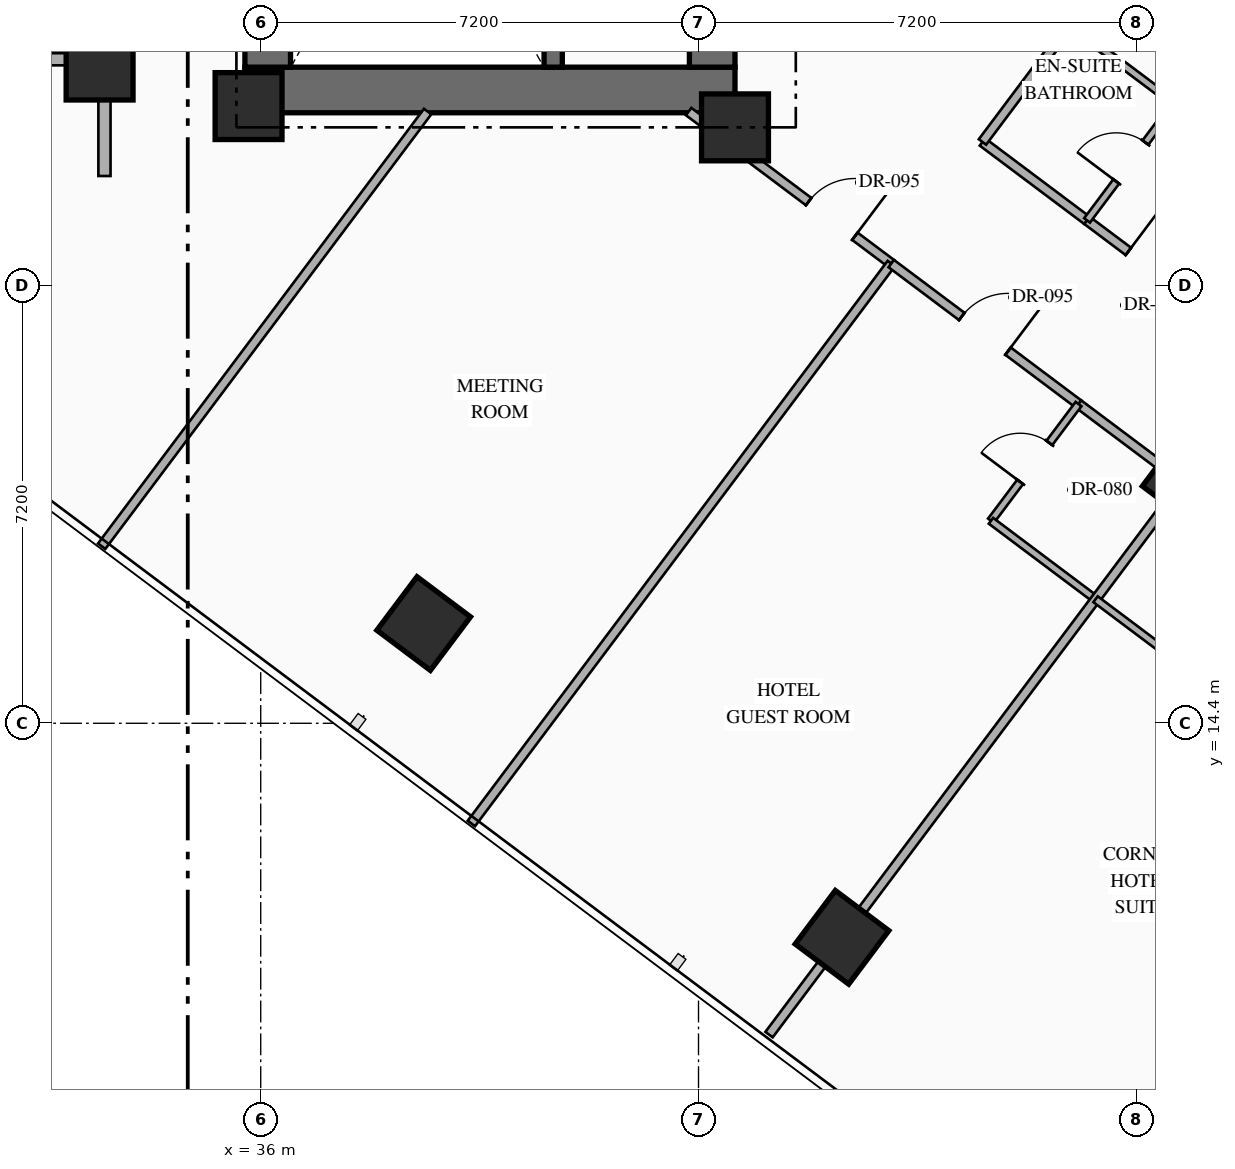
"""IFC4 building model, lengths in metres.
Left out: names, types, materials, properties, quantities, classifications, styles, units other than length and angle.
Written with IfcOpenShell. Run it as: python <this file> out.ifc"""

import sys

from ifc_helpers import new_model, si_unit, direction, frame, frame_2d, origin, origin_2d, place, context, subcontext, project, spatial, rectangle, hollow_rectangle, extrude, element, fill, save


model = new_model("IFC4")
c1 = context("Model", 3, precision=1e-05, world=origin(), true_north=direction((0.0, 1.0)))
c2 = subcontext(c1, "Body", "Model", "MODEL_VIEW")
j1 = project(units=[si_unit("LENGTHUNIT", "METRE"), si_unit("PLANEANGLEUNIT", "RADIAN")], contexts=[c1])
p1 = place(None, origin())
s1 = spatial("IfcSite", under=j1, at=p1, CompositionType="ELEMENT")
p2 = place(p1, origin())
s2 = spatial("IfcBuilding", under=s1, at=p2, CompositionType="ELEMENT")
p3 = place(p2, frame((0.0, 0.0, 63.4)))
s3 = spatial("IfcBuildingStorey", under=s2, at=p3, CompositionType="ELEMENT", Elevation=63.4)
p4 = place(p3, frame((35.74, 24.815, 0.0), z_axis=(0.0, 0.0, 1.0), x_axis=(1.0, 0.0, 0.0)))
e1 = element("IfcWall", 1, at=p4, inside=s3, PredefinedType="SHEAR", context=c2, shape_type="SweptSolid", body=[
    extrude(rectangle(XDim=8.06, YDim=0.75, at=frame_2d((4.03, 0.0))), origin(), (0.0, 0.0, 1.0), 3.35),
])
p5 = place(p3, frame((36.115, 25.19, 0.0), z_axis=(0.0, 0.0, 1.0), x_axis=(0.0, 1.0, 0.0)))
e2 = element("IfcWall", 2, at=p5, inside=s3, PredefinedType="SHEAR", context=c2, shape_type="SweptSolid", body=[
    extrude(rectangle(XDim=9.48, YDim=0.75, at=frame_2d((4.74, 0.0))), origin(), (0.0, 0.0, 1.0), 3.35),
])
p6 = place(p3, frame((43.425, 25.19, 0.0), z_axis=(0.0, 0.0, 1.0), x_axis=(0.0, 1.0, 0.0)))
e3 = element("IfcWall", 3, at=p6, inside=s3, PredefinedType="SHEAR", context=c2, shape_type="SweptSolid", body=[
    extrude(rectangle(XDim=9.48, YDim=0.75, at=frame_2d((4.74, 0.0))), origin(), (0.0, 0.0, 1.0), 3.35),
])
p7 = place(p6, frame((1.51, 0.0, 0.0)))
e4 = element("IfcOpeningElement", 4, at=p7, cuts=e3, PredefinedType="OPENING", context=c2, shape_type="SweptSolid", body=[
    extrude(rectangle(XDim=0.85, YDim=2.08, at=frame_2d((0.425, 1.04))), frame((0.0, 0.385, 0.0), z_axis=(0.0, -1.0, 0.0), x_axis=(1.0, 0.0, 0.0)), (0.0, 0.0, 1.0), 0.77),
])
p8 = place(p6, frame((4.76, 0.0, 0.0)))
e5 = element("IfcOpeningElement", 5, at=p8, cuts=e3, PredefinedType="OPENING", context=c2, shape_type="SweptSolid", body=[
    extrude(rectangle(XDim=0.85, YDim=2.08, at=frame_2d((0.425, 1.04))), frame((0.0, 0.385, 0.0), z_axis=(0.0, -1.0, 0.0), x_axis=(1.0, 0.0, 0.0)), (0.0, 0.0, 1.0), 0.77),
])
p9 = place(p3, frame((40.81, 25.19, 0.0), z_axis=(0.0, 0.0, 1.0), x_axis=(0.0, 1.0, 0.0)))
e6 = element("IfcWall", 6, at=p9, inside=s3, PredefinedType="SHEAR", context=c2, shape_type="SweptSolid", body=[
    extrude(rectangle(XDim=9.48, YDim=0.3, at=frame_2d((4.74, 0.0))), origin(), (0.0, 0.0, 1.0), 3.35),
])
for number, where, z_axis, x_axis in (
    (7, (35.8, 24.55, 0.0), (0.0, 0.0, 1.0), (1.0, 0.0, 0.0)),
    (8, (43.8, 24.2, 0.0), (0.0, 0.0, 1.0), (1.0, 0.0, 0.0)),
):
    element("IfcColumn", number, at=place(p3, frame(where, z_axis=z_axis, x_axis=x_axis)), inside=s3, PredefinedType="COLUMN", context=c2, shape_type="SweptSolid", body=[
        extrude(rectangle(XDim=1.1, YDim=1.1, at=origin_2d()), origin(), (0.0, 0.0, 1.0), 3.35),
    ])
for number, where, z_axis, x_axis in (
    (9, (33.35, 25.2, 0.0), (0.0, 0.0, 1.0), (1.0, 0.0, 0.0)),
    (10, (38.68, 16.04, 0.0), (0.0, 0.0, 1.0), (0.8, -0.6, 0.0)),
    (11, (45.56, 10.88, 0.0), (0.0, 0.0, 1.0), (0.8, -0.6, 0.0)),
):
    element("IfcColumn", number, at=place(p3, frame(where, z_axis=z_axis, x_axis=x_axis)), inside=s3, PredefinedType="COLUMN", context=c2, shape_type="SweptSolid", body=[
        extrude(hollow_rectangle(XDim=1.1, YDim=1.1, WallThickness=0.04, at=origin_2d()), origin(), (0.0, 0.0, 1.0), 3.35),
    ])
p10 = place(p3, frame((51.2, 18.4, 0.0), z_axis=(0.0, 0.0, 1.0), x_axis=(0.799999996291, -0.600000004945, 0.0)))
e12 = element("IfcColumn", 12, at=p10, inside=s3, PredefinedType="COLUMN", context=c2, shape_type="SweptSolid", body=[
    extrude(hollow_rectangle(XDim=1.0, YDim=1.0, WallThickness=0.038, at=origin_2d()), origin(), (0.0, 0.0, 1.0), 3.35),
])
p11 = place(p3, frame((44.86, 40.73, 0.0), z_axis=(0.0, 0.0, 1.0), x_axis=(0.800006902154, -0.599990797017, 0.0)))
e13 = element("IfcWall", 13, at=p11, inside=s3, PredefinedType="STANDARD", context=c2, shape_type="SweptSolid", body=[
    extrude(rectangle(XDim=29.712, YDim=0.28, at=frame_2d((14.856, 0.0))), origin(), (0.0, 0.0, 1.0), 3.13),
])
p12 = place(p11, frame((14.249, 0.0, 0.0)))
e14 = element("IfcOpeningElement", 14, at=p12, cuts=e13, PredefinedType="OPENING", context=c2, shape_type="SweptSolid", body=[
    extrude(rectangle(XDim=1.1, YDim=2.2, at=frame_2d((0.55, 1.1))), frame((0.0, 0.15, 0.0), z_axis=(0.0, -1.0, 0.0), x_axis=(1.0, 0.0, 0.0)), (0.0, 0.0, 1.0), 0.3),
])
p13 = place(p11, frame((1.612, 0.0, 0.85)))
e15 = element("IfcOpeningElement", 15, at=p13, cuts=e13, PredefinedType="OPENING", context=c2, shape_type="SweptSolid", body=[
    extrude(rectangle(XDim=1.4, YDim=1.8, at=frame_2d((0.7, 0.9))), frame((0.0, 0.15, 0.0), z_axis=(0.0, -1.0, 0.0), x_axis=(1.0, 0.0, 0.0)), (0.0, 0.0, 1.0), 0.3),
])
p14 = place(p11, frame((5.667, 0.0, 0.85)))
e16 = element("IfcOpeningElement", 16, at=p14, cuts=e13, PredefinedType="OPENING", context=c2, shape_type="SweptSolid", body=[
    extrude(rectangle(XDim=1.4, YDim=1.8, at=frame_2d((0.7, 0.9))), frame((0.0, 0.15, 0.0), z_axis=(0.0, -1.0, 0.0), x_axis=(1.0, 0.0, 0.0)), (0.0, 0.0, 1.0), 0.3),
])
p15 = place(p11, frame((9.912, 0.0, 0.85)))
e17 = element("IfcOpeningElement", 17, at=p15, cuts=e13, PredefinedType="OPENING", context=c2, shape_type="SweptSolid", body=[
    extrude(rectangle(XDim=1.4, YDim=1.8, at=frame_2d((0.7, 0.9))), frame((0.0, 0.15, 0.0), z_axis=(0.0, -1.0, 0.0), x_axis=(1.0, 0.0, 0.0)), (0.0, 0.0, 1.0), 0.3),
])
p16 = place(p11, frame((19.528, 0.0, 0.85)))
e18 = element("IfcOpeningElement", 18, at=p16, cuts=e13, PredefinedType="OPENING", context=c2, shape_type="SweptSolid", body=[
    extrude(rectangle(XDim=1.4, YDim=1.8, at=frame_2d((0.7, 0.9))), frame((0.0, 0.15, 0.0), z_axis=(0.0, -1.0, 0.0), x_axis=(1.0, 0.0, 0.0)), (0.0, 0.0, 1.0), 0.3),
])
p17 = place(p11, frame((23.451, 0.0, 0.85)))
e19 = element("IfcOpeningElement", 19, at=p17, cuts=e13, PredefinedType="OPENING", context=c2, shape_type="SweptSolid", body=[
    extrude(rectangle(XDim=1.4, YDim=1.8, at=frame_2d((0.7, 0.9))), frame((0.0, 0.15, 0.0), z_axis=(0.0, -1.0, 0.0), x_axis=(1.0, 0.0, 0.0)), (0.0, 0.0, 1.0), 0.3),
])
p18 = place(p11, frame((27.852, 0.0, 0.85)))
e20 = element("IfcOpeningElement", 20, at=p18, cuts=e13, PredefinedType="OPENING", context=c2, shape_type="SweptSolid", body=[
    extrude(rectangle(XDim=1.4, YDim=1.8, at=frame_2d((0.7, 0.9))), frame((0.0, 0.15, 0.0), z_axis=(0.0, -1.0, 0.0), x_axis=(1.0, 0.0, 0.0)), (0.0, 0.0, 1.0), 0.3),
])
p19 = place(p3, frame((33.43, 23.4, 0.0), z_axis=(0.0, 0.0, 1.0), x_axis=(0.0, 1.0, 0.0)))
e21 = element("IfcWall", 21, at=p19, inside=s3, PredefinedType="STANDARD", context=c2, shape_type="SweptSolid", body=[
    extrude(rectangle(XDim=4.08, YDim=0.2, at=frame_2d((2.04, 0.0))), origin(), (0.0, 0.0, 1.0), 2.425),
])
p20 = place(p3, frame((25.55, 25.32, 0.0), z_axis=(0.0, 0.0, 1.0), x_axis=(1.0, 0.0, 0.0)))
e22 = element("IfcWall", 22, at=p20, inside=s3, PredefinedType="STANDARD", context=c2, shape_type="SweptSolid", body=[
    extrude(rectangle(XDim=7.88, YDim=0.2, at=frame_2d((3.94, 0.0))), origin(), (0.0, 0.0, 1.0), 2.525),
])
p21 = place(p3, frame((43.037, 24.46, 0.0), z_axis=(0.0, 0.0, 1.0), x_axis=(0.799971872363, -0.600037501685, 0.0)))
e23 = element("IfcWall", 23, at=p21, inside=s3, PredefinedType="PARTITIONING", context=c2, shape_type="SweptSolid", body=[
    extrude(rectangle(XDim=4.167, YDim=0.15, at=frame_2d((2.083, 0.0))), origin(), (0.0, 0.0, 1.0), 2.425),
])
p22 = place(p21, frame((2.468, 0.0, 0.0)))
e24 = element("IfcOpeningElement", 24, at=p22, cuts=e23, PredefinedType="OPENING", context=c2, shape_type="SweptSolid", body=[
    extrude(rectangle(XDim=0.95, YDim=2.15, at=frame_2d((0.475, 1.075))), frame((0.0, 0.085, 0.0), z_axis=(0.0, -1.0, 0.0), x_axis=(1.0, 0.0, 0.0)), (0.0, 0.0, 1.0), 0.17),
])
p23 = place(p3, frame((33.384, 17.312, 0.0), z_axis=(0.0, 0.0, 1.0), x_axis=(0.600008743659, 0.799993442181, 0.0)))
e25 = element("IfcWall", 25, at=p23, inside=s3, PredefinedType="PARTITIONING", context=c2, shape_type="SweptSolid", body=[
    extrude(rectangle(XDim=8.935, YDim=0.15, at=frame_2d((4.468, 0.0))), origin(), (0.0, 0.0, 1.0), 3.13),
])
p24 = place(p3, frame((39.464, 12.752, 0.0), z_axis=(0.0, 0.0, 1.0), x_axis=(0.6, 0.8, 0.0)))
e26 = element("IfcWall", 26, at=p24, inside=s3, PredefinedType="PARTITIONING", context=c2, shape_type="SweptSolid", body=[
    extrude(rectangle(XDim=11.51, YDim=0.15, at=frame_2d((5.755, 0.0))), origin(), (0.0, 0.0, 1.0), 3.13),
])
p25 = place(p3, frame((47.87, 23.96, 0.0), z_axis=(0.0, 0.0, 1.0), x_axis=(0.79998637334, -0.60001816845, 0.0)))
e27 = element("IfcWall", 27, at=p25, inside=s3, PredefinedType="PARTITIONING", context=c2, shape_type="SweptSolid", body=[
    extrude(rectangle(XDim=2.15, YDim=0.15, at=frame_2d((1.075, 0.0))), origin(), (0.0, 0.0, 1.0), 2.775),
])
p26 = place(p3, frame((49.59, 22.67, 0.0), z_axis=(0.0, 0.0, 1.0), x_axis=(0.800011056104, -0.599985258246, 0.0)))
e28 = element("IfcWall", 28, at=p26, inside=s3, PredefinedType="PARTITIONING", context=c2, shape_type="SweptSolid", body=[
    extrude(rectangle(XDim=2.65, YDim=0.15, at=frame_2d((1.325, 0.0))), origin(), (0.0, 0.0, 1.0), 2.775),
])
p27 = place(p26, frame((0.85, 0.0, 0.0)))
e29 = element("IfcOpeningElement", 29, at=p27, cuts=e28, PredefinedType="OPENING", context=c2, shape_type="SweptSolid", body=[
    extrude(rectangle(XDim=0.95, YDim=2.15, at=frame_2d((0.475, 1.075))), frame((0.0, 0.085, 0.0), z_axis=(0.0, -1.0, 0.0), x_axis=(1.0, 0.0, 0.0)), (0.0, 0.0, 1.0), 0.17),
])
p28 = place(p3, frame((49.59, 22.67, 0.0), z_axis=(0.0, 0.0, 1.0), x_axis=(0.599951172744, 0.800036618114, 0.0)))
e30 = element("IfcWall", 30, at=p28, inside=s3, PredefinedType="PARTITIONING", context=c2, shape_type="SweptSolid", body=[
    extrude(rectangle(XDim=2.4, YDim=0.12, at=frame_2d((1.2, 0.0))), origin(), (0.0, 0.0, 1.0), 3.13),
])
p29 = place(p28, frame((0.8, 0.0, 0.0)))
e31 = element("IfcOpeningElement", 31, at=p29, cuts=e30, PredefinedType="OPENING", context=c2, shape_type="SweptSolid", body=[
    extrude(rectangle(XDim=0.8, YDim=2.06, at=frame_2d((0.4, 1.03))), frame((0.0, 0.07, 0.0), z_axis=(0.0, -1.0, 0.0), x_axis=(1.0, 0.0, 0.0)), (0.0, 0.0, 1.0), 0.14),
])
p30 = place(p3, frame((49.31, 25.88, 0.0), z_axis=(0.0, 0.0, 1.0), x_axis=(0.800040880289, -0.59994548908, 0.0)))
e32 = element("IfcWall", 32, at=p30, inside=s3, PredefinedType="PARTITIONING", context=c2, shape_type="SweptSolid", body=[
    extrude(rectangle(XDim=2.15, YDim=0.12, at=frame_2d((1.075, 0.0))), origin(), (0.0, 0.0, 1.0), 3.13),
])
p31 = place(p3, frame((47.87, 23.96, 0.0), z_axis=(0.0, 0.0, 1.0), x_axis=(0.599996617946, 0.80000253653, 0.0)))
e33 = element("IfcWall", 33, at=p31, inside=s3, PredefinedType="PARTITIONING", context=c2, shape_type="SweptSolid", body=[
    extrude(rectangle(XDim=11.55, YDim=0.15, at=frame_2d((5.775, 0.0))), origin(), (0.0, 0.0, 1.0), 3.13),
])
p32 = place(p3, frame((46.37, 21.96, 0.0), z_axis=(0.0, 0.0, 1.0), x_axis=(0.799977170108, -0.600030438649, 0.0)))
e34 = element("IfcWall", 34, at=p32, inside=s3, PredefinedType="PARTITIONING", context=c2, shape_type="SweptSolid", body=[
    extrude(rectangle(XDim=3.85, YDim=0.15, at=frame_2d((1.925, 0.0))), origin(), (0.0, 0.0, 1.0), 2.425),
])
p33 = place(p32, frame((1.45, 0.0, 0.0)))
e35 = element("IfcOpeningElement", 35, at=p33, cuts=e34, PredefinedType="OPENING", context=c2, shape_type="SweptSolid", body=[
    extrude(rectangle(XDim=0.95, YDim=2.15, at=frame_2d((0.475, 1.075))), frame((0.0, 0.085, 0.0), z_axis=(0.0, -1.0, 0.0), x_axis=(1.0, 0.0, 0.0)), (0.0, 0.0, 1.0), 0.17),
])
p34 = place(p3, frame((49.45, 19.65, 0.0), z_axis=(0.0, 0.0, 1.0), x_axis=(0.800040880289, -0.59994548908, 0.0)))
e36 = element("IfcWall", 36, at=p34, inside=s3, PredefinedType="PARTITIONING", context=c2, shape_type="SweptSolid", body=[
    extrude(rectangle(XDim=2.15, YDim=0.15, at=frame_2d((1.075, 0.0))), origin(), (0.0, 0.0, 1.0), 2.425),
])
p35 = place(p3, frame((48.01, 17.73, 0.0), z_axis=(0.0, 0.0, 1.0), x_axis=(0.6, 0.8, 0.0)))
e37 = element("IfcWall", 37, at=p35, inside=s3, PredefinedType="PARTITIONING", context=c2, shape_type="SweptSolid", body=[
    extrude(rectangle(XDim=2.4, YDim=0.12, at=frame_2d((1.2, 0.0))), origin(), (0.0, 0.0, 1.0), 3.13),
])
p36 = place(p35, frame((0.8, 0.0, 0.0)))
e38 = element("IfcOpeningElement", 38, at=p36, cuts=e37, PredefinedType="OPENING", context=c2, shape_type="SweptSolid", body=[
    extrude(rectangle(XDim=0.8, YDim=2.06, at=frame_2d((0.4, 1.03))), frame((0.0, 0.07, 0.0), z_axis=(0.0, -1.0, 0.0), x_axis=(1.0, 0.0, 0.0)), (0.0, 0.0, 1.0), 0.14),
])
p37 = place(p3, frame((48.01, 17.73, 0.0), z_axis=(0.0, 0.0, 1.0), x_axis=(0.79998637334, -0.60001816845, 0.0)))
e39 = element("IfcWall", 39, at=p37, inside=s3, PredefinedType="PARTITIONING", context=c2, shape_type="SweptSolid", body=[
    extrude(rectangle(XDim=2.15, YDim=0.12, at=frame_2d((1.075, 0.0))), origin(), (0.0, 0.0, 1.0), 3.13),
])
p38 = place(p3, frame((44.36, 9.28, 0.0), z_axis=(0.0, 0.0, 1.0), x_axis=(0.599986233332, 0.800010324816, 0.0)))
e40 = element("IfcWall", 40, at=p38, inside=s3, PredefinedType="PARTITIONING", context=c2, shape_type="SweptSolid", body=[
    extrude(rectangle(XDim=11.35, YDim=0.15, at=frame_2d((5.675, 0.0))), origin(), (0.0, 0.0, 1.0), 2.425),
])
p39 = place(p3, frame((49.73, 16.44, 0.0), z_axis=(0.0, 0.0, 1.0), x_axis=(0.79998637334, -0.60001816845, 0.0)))
e41 = element("IfcWall", 41, at=p39, inside=s3, PredefinedType="PARTITIONING", context=c2, shape_type="SweptSolid", body=[
    extrude(rectangle(XDim=2.15, YDim=0.12, at=frame_2d((1.075, 0.0))), origin(), (0.0, 0.0, 1.0), 3.13),
])
p40 = place(p3, frame((49.8, 5.2, 0.0), z_axis=(0.0, 0.0, 1.0), x_axis=(0.6, 0.8, 0.0)))
e42 = element("IfcWall", 42, at=p40, inside=s3, PredefinedType="PARTITIONING", context=c2, shape_type="SweptSolid", body=[
    extrude(rectangle(XDim=11.35, YDim=0.15, at=frame_2d((5.675, 0.0))), origin(), (0.0, 0.0, 1.0), 3.13),
])
p41 = place(p22, origin())
e43 = element("IfcDoor", 43, at=p41, inside=s3, OperationType="SINGLE_SWING_RIGHT", PredefinedType="DOOR", context=c2, shape_type="SweptSolid", body=[
    extrude(rectangle(XDim=0.95, YDim=2.15, at=frame_2d((0.475, 1.075))), frame((0.0, 0.025, 0.0), z_axis=(0.0, -1.0, 0.0), x_axis=(1.0, 0.0, 0.0)), (0.0, 0.0, 1.0), 0.05),
])
fill(e24, e43)
p42 = place(p27, origin())
e44 = element("IfcDoor", 44, at=p42, inside=s3, OperationType="SINGLE_SWING_LEFT", PredefinedType="DOOR", context=c2, shape_type="SweptSolid", body=[
    extrude(rectangle(XDim=0.95, YDim=2.15, at=frame_2d((0.475, 1.075))), frame((0.0, 0.025, 0.0), z_axis=(0.0, -1.0, 0.0), x_axis=(1.0, 0.0, 0.0)), (0.0, 0.0, 1.0), 0.05),
])
fill(e29, e44)
p43 = place(p29, origin())
e45 = element("IfcDoor", 45, at=p43, inside=s3, OperationType="SINGLE_SWING_LEFT", PredefinedType="DOOR", context=c2, shape_type="SweptSolid", body=[
    extrude(rectangle(XDim=0.8, YDim=2.06, at=frame_2d((0.4, 1.03))), frame((0.0, 0.025, 0.0), z_axis=(0.0, -1.0, 0.0), x_axis=(1.0, 0.0, 0.0)), (0.0, 0.0, 1.0), 0.05),
])
fill(e31, e45)
p44 = place(p33, origin())
e46 = element("IfcDoor", 46, at=p44, inside=s3, OperationType="SINGLE_SWING_RIGHT", PredefinedType="DOOR", context=c2, shape_type="SweptSolid", body=[
    extrude(rectangle(XDim=0.95, YDim=2.15, at=frame_2d((0.475, 1.075))), frame((0.0, 0.025, 0.0), z_axis=(0.0, -1.0, 0.0), x_axis=(1.0, 0.0, 0.0)), (0.0, 0.0, 1.0), 0.05),
])
fill(e35, e46)
p45 = place(p36, origin())
e47 = element("IfcDoor", 47, at=p45, inside=s3, OperationType="SINGLE_SWING_LEFT", PredefinedType="DOOR", context=c2, shape_type="SweptSolid", body=[
    extrude(rectangle(XDim=0.8, YDim=2.06, at=frame_2d((0.4, 1.03))), frame((0.0, 0.025, 0.0), z_axis=(0.0, -1.0, 0.0), x_axis=(1.0, 0.0, 0.0)), (0.0, 0.0, 1.0), 0.05),
])
fill(e38, e47)
save(model, sys.argv[1])
